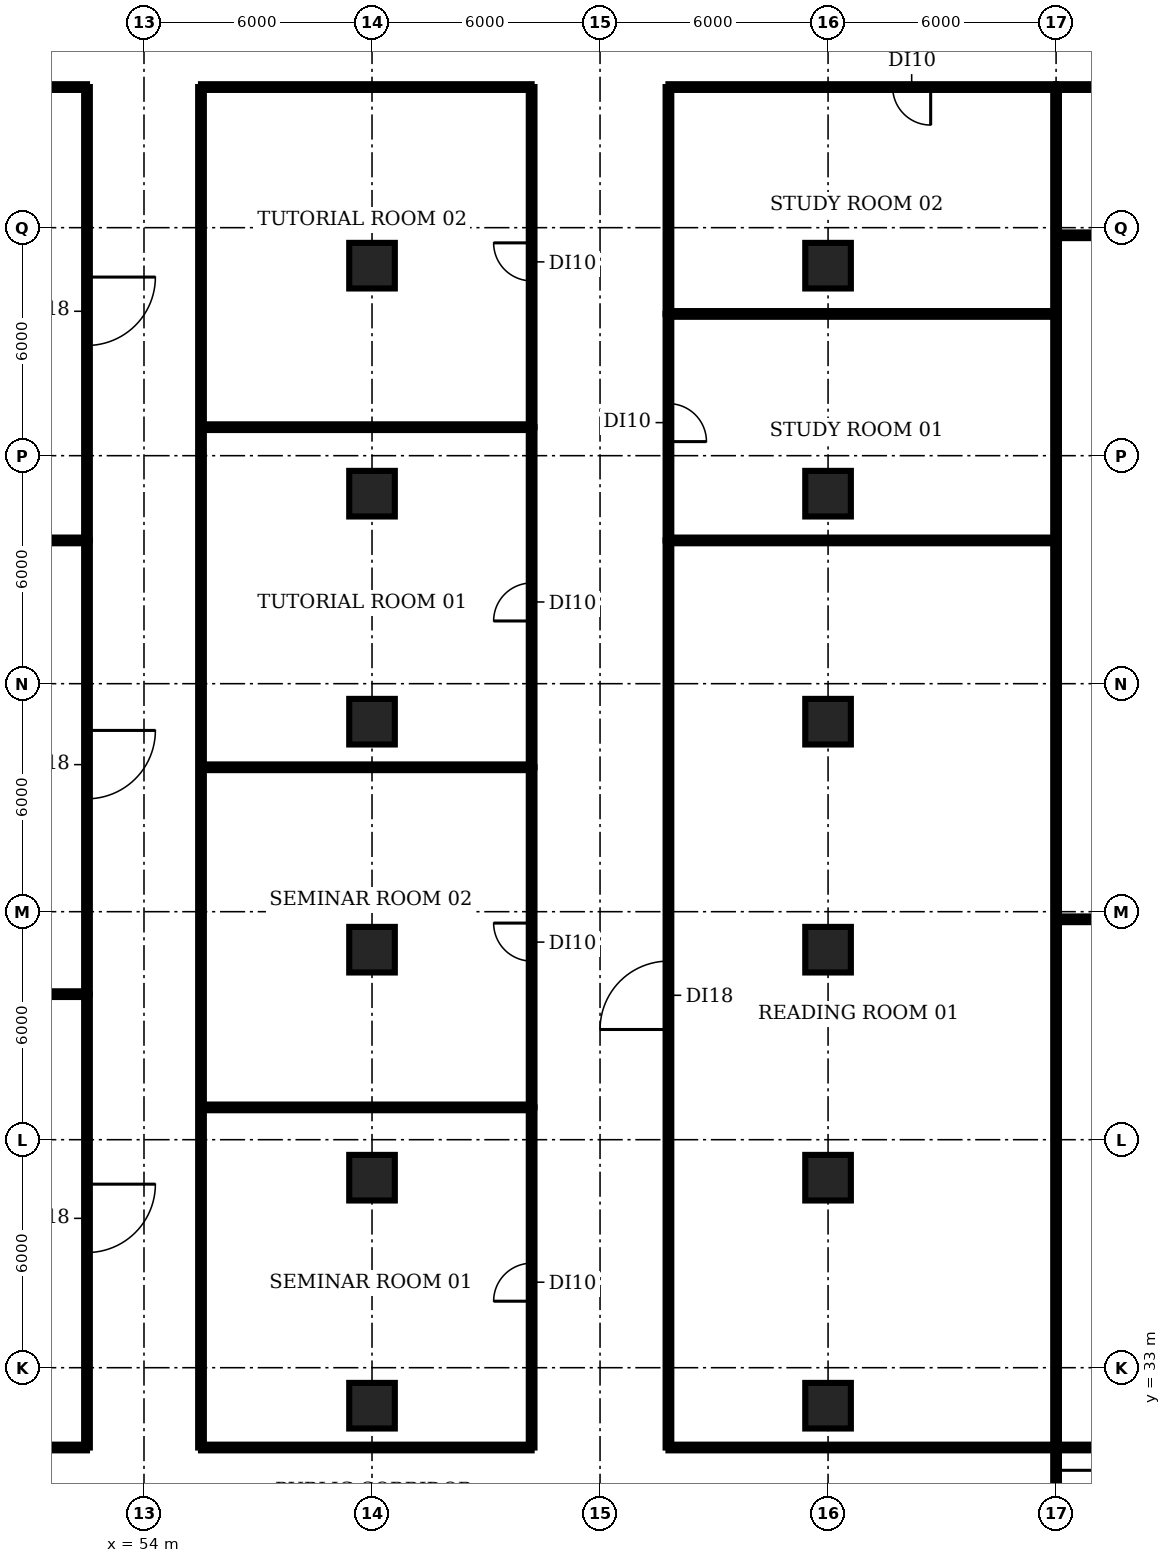
"""IFC4 building model, lengths in metres.
Left out: names, types, materials, properties, quantities, classifications, styles, units other than length and angle.
Written with IfcOpenShell. Run it as: python <this file> out.ifc"""

import sys

from ifc_helpers import new_model, si_unit, direction, frame, frame_2d, origin, origin_2d, place, context, subcontext, project, spatial, rectangle, extrude, element, fill, save


model = new_model("IFC4")
c1 = context("Model", 3, precision=1e-05, world=origin(), true_north=direction((0.0, 1.0)))
c2 = subcontext(c1, "Body", "Model", "MODEL_VIEW")
j1 = project(units=[si_unit("LENGTHUNIT", "METRE"), si_unit("PLANEANGLEUNIT", "RADIAN")], contexts=[c1])
p1 = place(None, origin())
s1 = spatial("IfcSite", under=j1, at=p1, CompositionType="ELEMENT")
p2 = place(p1, origin())
s2 = spatial("IfcBuilding", under=s1, at=p2, CompositionType="ELEMENT")
p3 = place(p2, frame((0.0, 0.0, 6.0)))
s3 = spatial("IfcBuildingStorey", under=s2, at=p3, CompositionType="ELEMENT", Elevation=6.0)
for number, where, z_axis, x_axis in (
    (1, (60.0, 32.0, 0.0), (0.0, 0.0, 1.0), (1.0, 0.0, 0.0)),
    (2, (60.0, 38.0, 0.0), (0.0, 0.0, 1.0), (1.0, 0.0, 0.0)),
    (3, (60.0, 44.0, 0.0), (0.0, 0.0, 1.0), (1.0, 0.0, 0.0)),
    (4, (60.0, 50.0, 0.0), (0.0, 0.0, 1.0), (1.0, 0.0, 0.0)),
    (5, (60.0, 56.0, 0.0), (0.0, 0.0, 1.0), (1.0, 0.0, 0.0)),
    (6, (60.0, 62.0, 0.0), (0.0, 0.0, 1.0), (1.0, 0.0, 0.0)),
    (7, (72.0, 32.0, 0.0), (0.0, 0.0, 1.0), (1.0, 0.0, 0.0)),
    (8, (72.0, 38.0, 0.0), (0.0, 0.0, 1.0), (1.0, 0.0, 0.0)),
    (9, (72.0, 44.0, 0.0), (0.0, 0.0, 1.0), (1.0, 0.0, 0.0)),
    (10, (72.0, 50.0, 0.0), (0.0, 0.0, 1.0), (1.0, 0.0, 0.0)),
    (11, (72.0, 56.0, 0.0), (0.0, 0.0, 1.0), (1.0, 0.0, 0.0)),
    (12, (72.0, 62.0, 0.0), (0.0, 0.0, 1.0), (1.0, 0.0, 0.0)),
):
    element("IfcColumn", number, at=place(p3, frame(where, z_axis=z_axis, x_axis=x_axis)), inside=s3, PredefinedType="COLUMN", context=c2, shape_type="SweptSolid", body=[
        extrude(rectangle(XDim=1.2, YDim=1.2, at=origin_2d()), origin(), (0.0, 0.0, 1.0), 4.6),
    ])
for number, where, z_axis, x_axis in (
    (13, (31.5, 30.9, 0.0), (0.0, 0.0, 1.0), (1.0, 0.0, 0.0)),
    (14, (31.5, 42.83, 0.0), (0.0, 0.0, 1.0), (1.0, 0.0, 0.0)),
    (15, (31.5, 54.77, 0.0), (0.0, 0.0, 1.0), (1.0, 0.0, 0.0)),
):
    element("IfcWall", number, at=place(p3, frame(where, z_axis=z_axis, x_axis=x_axis)), inside=s3, PredefinedType="PARTITIONING", context=c2, shape_type="SweptSolid", body=[
        extrude(rectangle(XDim=21.0, YDim=0.15, at=frame_2d((10.5, 0.0))), origin(), (0.0, 0.0, 1.0), 3.18),
    ])
p4 = place(p3, frame((46.6, 66.7, 0.0), z_axis=(0.0, 0.0, 1.0), x_axis=(1.0, 0.0, 0.0)))
e16 = element("IfcWall", 16, at=p4, inside=s3, PredefinedType="PARTITIONING", context=c2, shape_type="SweptSolid", body=[
    extrude(rectangle(XDim=5.9, YDim=0.15, at=frame_2d((2.95, 0.0))), origin(), (0.0, 0.0, 1.0), 3.18),
])
p5 = place(p3, frame((52.5, 42.83, 0.0), z_axis=(0.0, 0.0, 1.0), x_axis=(0.0, -1.0, 0.0)))
e17 = element("IfcWall", 17, at=p5, inside=s3, PredefinedType="PARTITIONING", context=c2, shape_type="SweptSolid", body=[
    extrude(rectangle(XDim=11.93, YDim=0.15, at=frame_2d((5.965, 0.0))), origin(), (0.0, 0.0, 1.0), 3.18),
])
p6 = place(p5, frame((5.0, 0.0, 0.0)))
e18 = element("IfcOpeningElement", 18, at=p6, cuts=e17, PredefinedType="OPENING", context=c2, shape_type="SweptSolid", body=[
    extrude(rectangle(XDim=1.8, YDim=2.1, at=frame_2d((0.9, 1.05))), frame((0.0, 0.085, 0.0), z_axis=(0.0, -1.0, 0.0), x_axis=(1.0, 0.0, 0.0)), (0.0, 0.0, 1.0), 0.17),
])
p7 = place(p3, frame((52.5, 54.77, 0.0), z_axis=(0.0, 0.0, 1.0), x_axis=(0.0, -1.0, 0.0)))
e19 = element("IfcWall", 19, at=p7, inside=s3, PredefinedType="PARTITIONING", context=c2, shape_type="SweptSolid", body=[
    extrude(rectangle(XDim=11.94, YDim=0.15, at=frame_2d((5.97, 0.0))), origin(), (0.0, 0.0, 1.0), 3.18),
])
p8 = place(p7, frame((5.0, 0.0, 0.0)))
e20 = element("IfcOpeningElement", 20, at=p8, cuts=e19, PredefinedType="OPENING", context=c2, shape_type="SweptSolid", body=[
    extrude(rectangle(XDim=1.8, YDim=2.1, at=frame_2d((0.9, 1.05))), frame((0.0, 0.085, 0.0), z_axis=(0.0, -1.0, 0.0), x_axis=(1.0, 0.0, 0.0)), (0.0, 0.0, 1.0), 0.17),
])
p9 = place(p3, frame((52.5, 66.7, 0.0), z_axis=(0.0, 0.0, 1.0), x_axis=(0.0, -1.0, 0.0)))
e21 = element("IfcWall", 21, at=p9, inside=s3, PredefinedType="PARTITIONING", context=c2, shape_type="SweptSolid", body=[
    extrude(rectangle(XDim=11.93, YDim=0.15, at=frame_2d((5.965, 0.0))), origin(), (0.0, 0.0, 1.0), 3.18),
])
p10 = place(p9, frame((5.0, 0.0, 0.0)))
e22 = element("IfcOpeningElement", 22, at=p10, cuts=e21, PredefinedType="OPENING", context=c2, shape_type="SweptSolid", body=[
    extrude(rectangle(XDim=1.8, YDim=2.1, at=frame_2d((0.9, 1.05))), frame((0.0, 0.085, 0.0), z_axis=(0.0, -1.0, 0.0), x_axis=(1.0, 0.0, 0.0)), (0.0, 0.0, 1.0), 0.17),
])
p11 = place(p3, frame((55.5, 30.9, 0.0), z_axis=(0.0, 0.0, 1.0), x_axis=(0.0, 1.0, 0.0)))
e23 = element("IfcWall", 23, at=p11, inside=s3, PredefinedType="PARTITIONING", context=c2, shape_type="SweptSolid", body=[
    extrude(rectangle(XDim=35.8, YDim=0.15, at=frame_2d((17.9, 0.0))), origin(), (0.0, 0.0, 1.0), 3.18),
])
for number, where, z_axis, x_axis in (
    (24, (55.5, 30.9, 0.0), (0.0, 0.0, 1.0), (1.0, 0.0, 0.0)),
    (25, (55.5, 39.85, 0.0), (0.0, 0.0, 1.0), (1.0, 0.0, 0.0)),
    (26, (55.5, 48.8, 0.0), (0.0, 0.0, 1.0), (1.0, 0.0, 0.0)),
    (27, (55.5, 57.75, 0.0), (0.0, 0.0, 1.0), (1.0, 0.0, 0.0)),
    (28, (55.5, 66.7, 0.0), (0.0, 0.0, 1.0), (1.0, 0.0, 0.0)),
):
    element("IfcWall", number, at=place(p3, frame(where, z_axis=z_axis, x_axis=x_axis)), inside=s3, PredefinedType="PARTITIONING", context=c2, shape_type="SweptSolid", body=[
        extrude(rectangle(XDim=8.7, YDim=0.15, at=frame_2d((4.35, 0.0))), origin(), (0.0, 0.0, 1.0), 3.18),
    ])
p12 = place(p3, frame((64.2, 30.9, 0.0), z_axis=(0.0, 0.0, 1.0), x_axis=(0.0, 1.0, 0.0)))
e29 = element("IfcWall", 29, at=p12, inside=s3, PredefinedType="PARTITIONING", context=c2, shape_type="SweptSolid", body=[
    extrude(rectangle(XDim=8.95, YDim=0.15, at=frame_2d((4.475, 0.0))), origin(), (0.0, 0.0, 1.0), 3.18),
])
p13 = place(p12, frame((3.85, 0.0, 0.0)))
e30 = element("IfcOpeningElement", 30, at=p13, cuts=e29, PredefinedType="OPENING", context=c2, shape_type="SweptSolid", body=[
    extrude(rectangle(XDim=1.0, YDim=2.1, at=frame_2d((0.5, 1.05))), frame((0.0, 0.085, 0.0), z_axis=(0.0, -1.0, 0.0), x_axis=(1.0, 0.0, 0.0)), (0.0, 0.0, 1.0), 0.17),
])
p14 = place(p3, frame((64.2, 39.85, 0.0), z_axis=(0.0, 0.0, 1.0), x_axis=(0.0, 1.0, 0.0)))
e31 = element("IfcWall", 31, at=p14, inside=s3, PredefinedType="PARTITIONING", context=c2, shape_type="SweptSolid", body=[
    extrude(rectangle(XDim=8.95, YDim=0.15, at=frame_2d((4.475, 0.0))), origin(), (0.0, 0.0, 1.0), 3.18),
])
p15 = place(p14, frame((3.85, 0.0, 0.0)))
e32 = element("IfcOpeningElement", 32, at=p15, cuts=e31, PredefinedType="OPENING", context=c2, shape_type="SweptSolid", body=[
    extrude(rectangle(XDim=1.0, YDim=2.1, at=frame_2d((0.5, 1.05))), frame((0.0, 0.085, 0.0), z_axis=(0.0, -1.0, 0.0), x_axis=(1.0, 0.0, 0.0)), (0.0, 0.0, 1.0), 0.17),
])
p16 = place(p3, frame((64.2, 48.8, 0.0), z_axis=(0.0, 0.0, 1.0), x_axis=(0.0, 1.0, 0.0)))
e33 = element("IfcWall", 33, at=p16, inside=s3, PredefinedType="PARTITIONING", context=c2, shape_type="SweptSolid", body=[
    extrude(rectangle(XDim=8.95, YDim=0.15, at=frame_2d((4.475, 0.0))), origin(), (0.0, 0.0, 1.0), 3.18),
])
p17 = place(p16, frame((3.85, 0.0, 0.0)))
e34 = element("IfcOpeningElement", 34, at=p17, cuts=e33, PredefinedType="OPENING", context=c2, shape_type="SweptSolid", body=[
    extrude(rectangle(XDim=1.0, YDim=2.1, at=frame_2d((0.5, 1.05))), frame((0.0, 0.085, 0.0), z_axis=(0.0, -1.0, 0.0), x_axis=(1.0, 0.0, 0.0)), (0.0, 0.0, 1.0), 0.17),
])
p18 = place(p3, frame((64.2, 57.75, 0.0), z_axis=(0.0, 0.0, 1.0), x_axis=(0.0, 1.0, 0.0)))
e35 = element("IfcWall", 35, at=p18, inside=s3, PredefinedType="PARTITIONING", context=c2, shape_type="SweptSolid", body=[
    extrude(rectangle(XDim=8.95, YDim=0.15, at=frame_2d((4.475, 0.0))), origin(), (0.0, 0.0, 1.0), 3.18),
])
p19 = place(p18, frame((3.85, 0.0, 0.0)))
e36 = element("IfcOpeningElement", 36, at=p19, cuts=e35, PredefinedType="OPENING", context=c2, shape_type="SweptSolid", body=[
    extrude(rectangle(XDim=1.0, YDim=2.1, at=frame_2d((0.5, 1.05))), frame((0.0, 0.085, 0.0), z_axis=(0.0, -1.0, 0.0), x_axis=(1.0, 0.0, 0.0)), (0.0, 0.0, 1.0), 0.17),
])
p20 = place(p3, frame((67.8, 30.9, 0.0), z_axis=(0.0, 0.0, 1.0), x_axis=(0.0, 1.0, 0.0)))
e37 = element("IfcWall", 37, at=p20, inside=s3, PredefinedType="PARTITIONING", context=c2, shape_type="SweptSolid", body=[
    extrude(rectangle(XDim=23.87, YDim=0.15, at=frame_2d((11.935, 0.0))), origin(), (0.0, 0.0, 1.0), 3.18),
])
p21 = place(p20, frame((11.0, 0.0, 0.0)))
e38 = element("IfcOpeningElement", 38, at=p21, cuts=e37, PredefinedType="OPENING", context=c2, shape_type="SweptSolid", body=[
    extrude(rectangle(XDim=1.8, YDim=2.1, at=frame_2d((0.9, 1.05))), frame((0.0, 0.085, 0.0), z_axis=(0.0, -1.0, 0.0), x_axis=(1.0, 0.0, 0.0)), (0.0, 0.0, 1.0), 0.17),
])
for number, where, z_axis, x_axis in (
    (39, (67.8, 30.9, 0.0), (0.0, 0.0, 1.0), (1.0, 0.0, 0.0)),
    (40, (67.8, 54.77, 0.0), (0.0, 0.0, 1.0), (1.0, 0.0, 0.0)),
):
    element("IfcWall", number, at=place(p3, frame(where, z_axis=z_axis, x_axis=x_axis)), inside=s3, PredefinedType="PARTITIONING", context=c2, shape_type="SweptSolid", body=[
        extrude(rectangle(XDim=10.2, YDim=0.15, at=frame_2d((5.1, 0.0))), origin(), (0.0, 0.0, 1.0), 3.18),
    ])
p22 = place(p3, frame((67.8, 60.73, 0.0), z_axis=(0.0, 0.0, 1.0), x_axis=(0.0, -1.0, 0.0)))
e41 = element("IfcWall", 41, at=p22, inside=s3, PredefinedType="PARTITIONING", context=c2, shape_type="SweptSolid", body=[
    extrude(rectangle(XDim=5.96, YDim=0.15, at=frame_2d((2.98, 0.0))), origin(), (0.0, 0.0, 1.0), 3.18),
])
p23 = place(p22, frame((2.36, 0.0, 0.0)))
e42 = element("IfcOpeningElement", 42, at=p23, cuts=e41, PredefinedType="OPENING", context=c2, shape_type="SweptSolid", body=[
    extrude(rectangle(XDim=1.0, YDim=2.1, at=frame_2d((0.5, 1.05))), frame((0.0, 0.085, 0.0), z_axis=(0.0, -1.0, 0.0), x_axis=(1.0, 0.0, 0.0)), (0.0, 0.0, 1.0), 0.17),
])
p24 = place(p3, frame((67.8, 60.73, 0.0), z_axis=(0.0, 0.0, 1.0), x_axis=(0.0, 1.0, 0.0)))
e43 = element("IfcWall", 43, at=p24, inside=s3, PredefinedType="PARTITIONING", context=c2, shape_type="SweptSolid", body=[
    extrude(rectangle(XDim=5.97, YDim=0.15, at=frame_2d((2.985, 0.0))), origin(), (0.0, 0.0, 1.0), 3.18),
])
p25 = place(p3, frame((67.8, 60.73, 0.0), z_axis=(0.0, 0.0, 1.0), x_axis=(1.0, 0.0, 0.0)))
e44 = element("IfcWall", 44, at=p25, inside=s3, PredefinedType="PARTITIONING", context=c2, shape_type="SweptSolid", body=[
    extrude(rectangle(XDim=10.2, YDim=0.15, at=frame_2d((5.1, 0.0))), origin(), (0.0, 0.0, 1.0), 3.18),
])
p26 = place(p3, frame((78.0, 30.9, 0.0), z_axis=(0.0, 0.0, 1.0), x_axis=(0.0, -1.0, 0.0)))
e45 = element("IfcWall", 45, at=p26, inside=s3, PredefinedType="PARTITIONING", context=c2, shape_type="SweptSolid", body=[
    extrude(rectangle(XDim=3.0, YDim=0.15, at=frame_2d((1.5, 0.0))), origin(), (0.0, 0.0, 1.0), 3.18),
])
p27 = place(p26, frame((0.6, 0.0, 0.0)))
e46 = element("IfcOpeningElement", 46, at=p27, cuts=e45, PredefinedType="OPENING", context=c2, shape_type="SweptSolid", body=[
    extrude(rectangle(XDim=1.8, YDim=2.1, at=frame_2d((0.9, 1.05))), frame((0.0, 0.085, 0.0), z_axis=(0.0, -1.0, 0.0), x_axis=(1.0, 0.0, 0.0)), (0.0, 0.0, 1.0), 0.17),
])
p28 = place(p3, frame((78.0, 30.9, 0.0), z_axis=(0.0, 0.0, 1.0), x_axis=(0.0, 1.0, 0.0)))
e47 = element("IfcWall", 47, at=p28, inside=s3, PredefinedType="PARTITIONING", context=c2, shape_type="SweptSolid", body=[
    extrude(rectangle(XDim=35.8, YDim=0.15, at=frame_2d((17.9, 0.0))), origin(), (0.0, 0.0, 1.0), 3.18),
])
p29 = place(p3, frame((78.0, 30.9, 0.0), z_axis=(0.0, 0.0, 1.0), x_axis=(1.0, 0.0, 0.0)))
e48 = element("IfcWall", 48, at=p29, inside=s3, PredefinedType="PARTITIONING", context=c2, shape_type="SweptSolid", body=[
    extrude(rectangle(XDim=15.7, YDim=0.15, at=frame_2d((7.85, 0.0))), origin(), (0.0, 0.0, 1.0), 3.18),
])
p30 = place(p29, frame((8.3, 0.0, 0.0)))
e49 = element("IfcOpeningElement", 49, at=p30, cuts=e48, PredefinedType="OPENING", context=c2, shape_type="SweptSolid", body=[
    extrude(rectangle(XDim=1.2, YDim=2.1, at=frame_2d((0.6, 1.05))), frame((0.0, 0.085, 0.0), z_axis=(0.0, -1.0, 0.0), x_axis=(1.0, 0.0, 0.0)), (0.0, 0.0, 1.0), 0.17),
])
p31 = place(p3, frame((78.0, 44.8, 0.0), z_axis=(0.0, 0.0, 1.0), x_axis=(1.0, 0.0, 0.0)))
e50 = element("IfcWall", 50, at=p31, inside=s3, PredefinedType="PARTITIONING", context=c2, shape_type="SweptSolid", body=[
    extrude(rectangle(XDim=15.7, YDim=0.15, at=frame_2d((7.85, 0.0))), origin(), (0.0, 0.0, 1.0), 3.18),
])
p32 = place(p3, frame((78.0, 62.8, 0.0), z_axis=(0.0, 0.0, 1.0), x_axis=(1.0, 0.0, 0.0)))
e51 = element("IfcWall", 51, at=p32, inside=s3, PredefinedType="PARTITIONING", context=c2, shape_type="SweptSolid", body=[
    extrude(rectangle(XDim=14.95, YDim=0.15, at=frame_2d((7.475, 0.0))), origin(), (0.0, 0.0, 1.0), 3.18),
])
p33 = place(p3, frame((78.0, 66.7, 0.0), z_axis=(0.0, 0.0, 1.0), x_axis=(-1.0, 0.0, 0.0)))
e52 = element("IfcWall", 52, at=p33, inside=s3, PredefinedType="PARTITIONING", context=c2, shape_type="SweptSolid", body=[
    extrude(rectangle(XDim=10.2, YDim=0.15, at=frame_2d((5.1, 0.0))), origin(), (0.0, 0.0, 1.0), 3.18),
])
p34 = place(p33, frame((3.3, 0.0, 0.0)))
e53 = element("IfcOpeningElement", 53, at=p34, cuts=e52, PredefinedType="OPENING", context=c2, shape_type="SweptSolid", body=[
    extrude(rectangle(XDim=1.0, YDim=2.1, at=frame_2d((0.5, 1.05))), frame((0.0, 0.085, 0.0), z_axis=(0.0, -1.0, 0.0), x_axis=(1.0, 0.0, 0.0)), (0.0, 0.0, 1.0), 0.17),
])
p35 = place(p3, frame((89.05, 66.7, 0.0), z_axis=(0.0, 0.0, 1.0), x_axis=(-1.0, 0.0, 0.0)))
e54 = element("IfcWall", 54, at=p35, inside=s3, PredefinedType="PARTITIONING", context=c2, shape_type="SweptSolid", body=[
    extrude(rectangle(XDim=11.05, YDim=0.15, at=frame_2d((5.525, 0.0))), origin(), (0.0, 0.0, 1.0), 3.18),
])
p36 = place(p35, frame((6.65, 0.0, 0.0)))
e55 = element("IfcOpeningElement", 55, at=p36, cuts=e54, PredefinedType="OPENING", context=c2, shape_type="SweptSolid", body=[
    extrude(rectangle(XDim=0.9, YDim=2.1, at=frame_2d((0.45, 1.05))), frame((0.0, 0.085, 0.0), z_axis=(0.0, -1.0, 0.0), x_axis=(1.0, 0.0, 0.0)), (0.0, 0.0, 1.0), 0.17),
])
p37 = place(p6, origin())
e56 = element("IfcDoor", 56, at=p37, inside=s3, OperationType="SINGLE_SWING_LEFT", PredefinedType="DOOR", context=c2, shape_type="SweptSolid", body=[
    extrude(rectangle(XDim=1.8, YDim=2.1, at=frame_2d((0.9, 1.05))), frame((0.0, 0.025, 0.0), z_axis=(0.0, -1.0, 0.0), x_axis=(1.0, 0.0, 0.0)), (0.0, 0.0, 1.0), 0.05),
])
fill(e18, e56)
p38 = place(p8, origin())
e57 = element("IfcDoor", 57, at=p38, inside=s3, OperationType="SINGLE_SWING_LEFT", PredefinedType="DOOR", context=c2, shape_type="SweptSolid", body=[
    extrude(rectangle(XDim=1.8, YDim=2.1, at=frame_2d((0.9, 1.05))), frame((0.0, 0.025, 0.0), z_axis=(0.0, -1.0, 0.0), x_axis=(1.0, 0.0, 0.0)), (0.0, 0.0, 1.0), 0.05),
])
fill(e20, e57)
p39 = place(p10, origin())
e58 = element("IfcDoor", 58, at=p39, inside=s3, OperationType="SINGLE_SWING_LEFT", PredefinedType="DOOR", context=c2, shape_type="SweptSolid", body=[
    extrude(rectangle(XDim=1.8, YDim=2.1, at=frame_2d((0.9, 1.05))), frame((0.0, 0.025, 0.0), z_axis=(0.0, -1.0, 0.0), x_axis=(1.0, 0.0, 0.0)), (0.0, 0.0, 1.0), 0.05),
])
fill(e22, e58)
p40 = place(p13, origin())
e59 = element("IfcDoor", 59, at=p40, inside=s3, OperationType="SINGLE_SWING_LEFT", PredefinedType="DOOR", context=c2, shape_type="SweptSolid", body=[
    extrude(rectangle(XDim=1.0, YDim=2.1, at=frame_2d((0.5, 1.05))), frame((0.0, 0.025, 0.0), z_axis=(0.0, -1.0, 0.0), x_axis=(1.0, 0.0, 0.0)), (0.0, 0.0, 1.0), 0.05),
])
fill(e30, e59)
p41 = place(p15, origin())
e60 = element("IfcDoor", 60, at=p41, inside=s3, OperationType="SINGLE_SWING_RIGHT", PredefinedType="DOOR", context=c2, shape_type="SweptSolid", body=[
    extrude(rectangle(XDim=1.0, YDim=2.1, at=frame_2d((0.5, 1.05))), frame((0.0, 0.025, 0.0), z_axis=(0.0, -1.0, 0.0), x_axis=(1.0, 0.0, 0.0)), (0.0, 0.0, 1.0), 0.05),
])
fill(e32, e60)
p42 = place(p17, origin())
e61 = element("IfcDoor", 61, at=p42, inside=s3, OperationType="SINGLE_SWING_LEFT", PredefinedType="DOOR", context=c2, shape_type="SweptSolid", body=[
    extrude(rectangle(XDim=1.0, YDim=2.1, at=frame_2d((0.5, 1.05))), frame((0.0, 0.025, 0.0), z_axis=(0.0, -1.0, 0.0), x_axis=(1.0, 0.0, 0.0)), (0.0, 0.0, 1.0), 0.05),
])
fill(e34, e61)
p43 = place(p19, origin())
e62 = element("IfcDoor", 62, at=p43, inside=s3, OperationType="SINGLE_SWING_RIGHT", PredefinedType="DOOR", context=c2, shape_type="SweptSolid", body=[
    extrude(rectangle(XDim=1.0, YDim=2.1, at=frame_2d((0.5, 1.05))), frame((0.0, 0.025, 0.0), z_axis=(0.0, -1.0, 0.0), x_axis=(1.0, 0.0, 0.0)), (0.0, 0.0, 1.0), 0.05),
])
fill(e36, e62)
p44 = place(p21, origin())
e63 = element("IfcDoor", 63, at=p44, inside=s3, OperationType="SINGLE_SWING_LEFT", PredefinedType="DOOR", context=c2, shape_type="SweptSolid", body=[
    extrude(rectangle(XDim=1.8, YDim=2.1, at=frame_2d((0.9, 1.05))), frame((0.0, 0.025, 0.0), z_axis=(0.0, -1.0, 0.0), x_axis=(1.0, 0.0, 0.0)), (0.0, 0.0, 1.0), 0.05),
])
fill(e38, e63)
p45 = place(p23, origin())
e64 = element("IfcDoor", 64, at=p45, inside=s3, OperationType="SINGLE_SWING_RIGHT", PredefinedType="DOOR", context=c2, shape_type="SweptSolid", body=[
    extrude(rectangle(XDim=1.0, YDim=2.1, at=frame_2d((0.5, 1.05))), frame((0.0, 0.025, 0.0), z_axis=(0.0, -1.0, 0.0), x_axis=(1.0, 0.0, 0.0)), (0.0, 0.0, 1.0), 0.05),
])
fill(e42, e64)
p46 = place(p27, origin())
e65 = element("IfcDoor", 65, at=p46, inside=s3, OperationType="SINGLE_SWING_LEFT", PredefinedType="DOOR", context=c2, shape_type="SweptSolid", body=[
    extrude(rectangle(XDim=1.8, YDim=2.1, at=frame_2d((0.9, 1.05))), frame((0.0, 0.025, 0.0), z_axis=(0.0, -1.0, 0.0), x_axis=(1.0, 0.0, 0.0)), (0.0, 0.0, 1.0), 0.05),
])
fill(e46, e65)
p47 = place(p34, origin())
e66 = element("IfcDoor", 66, at=p47, inside=s3, OperationType="SINGLE_SWING_LEFT", PredefinedType="DOOR", context=c2, shape_type="SweptSolid", body=[
    extrude(rectangle(XDim=1.0, YDim=2.1, at=frame_2d((0.5, 1.05))), frame((0.0, 0.025, 0.0), z_axis=(0.0, -1.0, 0.0), x_axis=(1.0, 0.0, 0.0)), (0.0, 0.0, 1.0), 0.05),
])
fill(e53, e66)
save(model, sys.argv[1])
